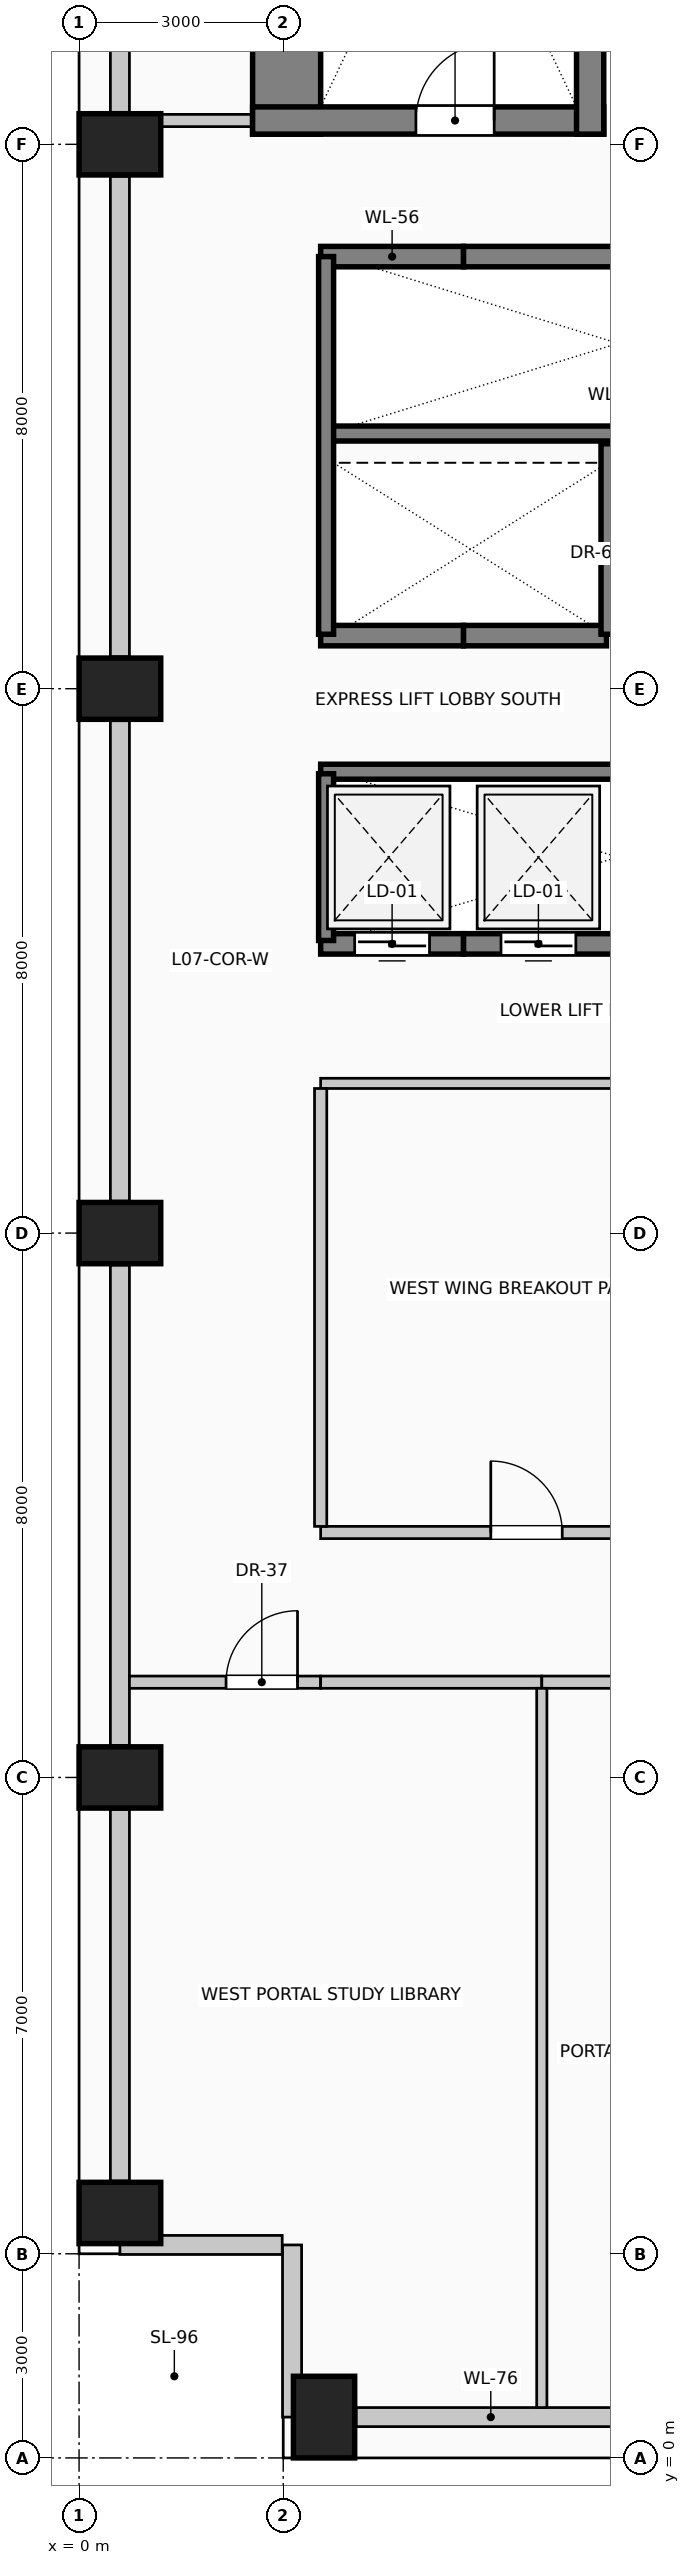
"""IFC4 building model, lengths in metres.
Left out: names, types, materials, properties, quantities, classifications, styles, units other than length and angle.
Written with IfcOpenShell. Run it as: python <this file> out.ifc"""

import sys

from ifc_helpers import new_model, si_unit, direction, frame, frame_2d, origin, origin_2d, place, context, subcontext, project, spatial, rectangle, extrude, element, fill, save


model = new_model("IFC4")
c1 = context("Model", 3, precision=1e-05, world=origin(), true_north=direction((0.0, 1.0)))
c2 = subcontext(c1, "Body", "Model", "MODEL_VIEW")
j1 = project(units=[si_unit("LENGTHUNIT", "METRE"), si_unit("PLANEANGLEUNIT", "RADIAN")], contexts=[c1])
p1 = place(None, origin())
s1 = spatial("IfcSite", under=j1, at=p1, CompositionType="ELEMENT")
p2 = place(p1, origin())
s2 = spatial("IfcBuilding", under=s1, at=p2, CompositionType="ELEMENT")
p3 = place(p2, frame((0.0, 0.0, 30.6)))
s3 = spatial("IfcBuildingStorey", under=s2, at=p3, CompositionType="ELEMENT", Elevation=30.6)
p4 = place(p3, frame((3.05, 34.15, 0.0), z_axis=(0.0, 0.0, 1.0), x_axis=(0.0, 1.0, 0.0)))
e1 = element("IfcWall", 1, at=p4, inside=s3, PredefinedType="SHEAR", context=c2, shape_type="SweptSolid", body=[
    extrude(rectangle(XDim=9.28, YDim=1.0, at=frame_2d((4.64, 0.0))), origin(), (0.0, 0.0, 1.0), 4.0),
])
p5 = place(p3, frame((2.55, 34.35, 0.0), z_axis=(0.0, 0.0, 1.0), x_axis=(1.0, 0.0, 0.0)))
e2 = element("IfcWall", 2, at=p5, inside=s3, PredefinedType="SHEAR", context=c2, shape_type="SweptSolid", body=[
    extrude(rectangle(XDim=5.16, YDim=0.4, at=frame_2d((2.58, 0.0))), origin(), (0.0, 0.0, 1.0), 4.0),
])
p6 = place(p5, frame((2.4, 0.0, 0.0)))
e3 = element("IfcOpeningElement", 3, at=p6, cuts=e2, PredefinedType="OPENING", context=c2, shape_type="SweptSolid", body=[
    extrude(rectangle(XDim=1.15, YDim=2.2, at=frame_2d((0.575, 1.1))), frame((0.0, 0.21, 0.0), z_axis=(0.0, -1.0, 0.0), x_axis=(1.0, 0.0, 0.0)), (0.0, 0.0, 1.0), 0.42),
])
p7 = place(p3, frame((7.51, 34.15, 0.0), z_axis=(0.0, 0.0, 1.0), x_axis=(0.0, 1.0, 0.0)))
e4 = element("IfcWall", 4, at=p7, inside=s3, PredefinedType="SHEAR", context=c2, shape_type="SweptSolid", body=[
    extrude(rectangle(XDim=9.28, YDim=0.4, at=frame_2d((4.64, 0.0))), origin(), (0.0, 0.0, 1.0), 4.0),
])
for number, where, z_axis, x_axis in (
    (5, (3.6, 0.6, 0.0), (0.0, 0.0, 1.0), (1.0, 0.0, 0.0)),
    (6, (0.6, 3.6, 0.0), (0.0, 0.0, 1.0), (0.0, 1.0, 0.0)),
    (7, (0.6, 10.0, 0.0), (0.0, 0.0, 1.0), (0.0, 1.0, 0.0)),
    (8, (0.6, 18.0, 0.0), (0.0, 0.0, 1.0), (0.0, 1.0, 0.0)),
    (9, (0.6, 26.0, 0.0), (0.0, 0.0, 1.0), (0.0, 1.0, 0.0)),
    (10, (0.6, 34.0, 0.0), (0.0, 0.0, 1.0), (0.0, 1.0, 0.0)),
):
    element("IfcColumn", number, at=place(p3, frame(where, z_axis=z_axis, x_axis=x_axis)), inside=s3, PredefinedType="COLUMN", context=c2, shape_type="SweptSolid", body=[
        extrude(rectangle(XDim=0.9, YDim=1.2, at=origin_2d()), origin(), (0.0, 0.0, 1.0), 4.0),
    ])
p8 = place(p3, frame((8.03, 0.6, 0.0), z_axis=(0.0, 0.0, 1.0), x_axis=(-1.0, 0.0, 0.0)))
e11 = element("IfcWall", 11, at=p8, inside=s3, PredefinedType="SOLIDWALL", context=c2, shape_type="SweptSolid", body=[
    extrude(rectangle(XDim=3.96, YDim=0.28, at=frame_2d((1.98, 0.0))), origin(), (0.0, 0.0, 1.0), 2.85),
])
p9 = place(p3, frame((0.6, 4.07, 0.0), z_axis=(0.0, 0.0, 1.0), x_axis=(0.0, 1.0, 0.0)))
e12 = element("IfcWall", 12, at=p9, inside=s3, PredefinedType="SOLIDWALL", context=c2, shape_type="SweptSolid", body=[
    extrude(rectangle(XDim=5.46, YDim=0.28, at=frame_2d((2.73, 0.0))), origin(), (0.0, 0.0, 1.0), 2.85),
])
for number, where, z_axis, x_axis in (
    (13, (0.6, 10.47, 0.0), (0.0, 0.0, 1.0), (0.0, 1.0, 0.0)),
    (14, (0.6, 18.47, 0.0), (0.0, 0.0, 1.0), (0.0, 1.0, 0.0)),
    (15, (0.6, 26.47, 0.0), (0.0, 0.0, 1.0), (0.0, 1.0, 0.0)),
):
    element("IfcWall", number, at=place(p3, frame(where, z_axis=z_axis, x_axis=x_axis)), inside=s3, PredefinedType="SOLIDWALL", context=c2, shape_type="SweptSolid", body=[
        extrude(rectangle(XDim=7.06, YDim=0.28, at=frame_2d((3.53, 0.0))), origin(), (0.0, 0.0, 1.0), 2.85),
    ])
p10 = place(p3, frame((0.6, 34.47, 0.0), z_axis=(0.0, 0.0, 1.0), x_axis=(0.0, 1.0, 0.0)))
e16 = element("IfcWall", 16, at=p10, inside=s3, PredefinedType="SOLIDWALL", context=c2, shape_type="SweptSolid", body=[
    extrude(rectangle(XDim=7.46, YDim=0.28, at=frame_2d((3.73, 0.0))), origin(), (0.0, 0.0, 1.0), 2.85),
])
p11 = place(p3, frame((3.13, 0.6, 0.0), z_axis=(0.0, 0.0, 1.0), x_axis=(0.0, 1.0, 0.0)))
e17 = element("IfcWall", 17, at=p11, inside=s3, PredefinedType="SOLIDWALL", context=c2, shape_type="SweptSolid", body=[
    extrude(rectangle(XDim=2.53, YDim=0.28, at=frame_2d((1.265, 0.0))), origin(), (0.0, 0.0, 1.0), 3.7),
])
p12 = place(p3, frame((2.985, 3.13, 0.0), z_axis=(0.0, 0.0, 1.0), x_axis=(-1.0, 0.0, 0.0)))
e18 = element("IfcWall", 18, at=p12, inside=s3, PredefinedType="SOLIDWALL", context=c2, shape_type="SweptSolid", body=[
    extrude(rectangle(XDim=2.385, YDim=0.28, at=frame_2d((1.192, 0.0))), origin(), (0.0, 0.0, 1.0), 3.7),
])
p13 = place(p3, frame((5.65, 22.25, 0.0), z_axis=(0.0, 0.0, 1.0), x_axis=(-1.0, 0.0, 0.0)))
e19 = element("IfcWall", 19, at=p13, inside=s3, PredefinedType="SOLIDWALL", context=c2, shape_type="SweptSolid", body=[
    extrude(rectangle(XDim=2.1, YDim=0.3, at=frame_2d((1.05, 0.0))), origin(), (0.0, 0.0, 1.0), 4.0),
])
p14 = place(p13, frame((0.5, 0.0, 0.0)))
e20 = element("IfcOpeningElement", 20, at=p14, cuts=e19, PredefinedType="OPENING", context=c2, shape_type="SweptSolid", body=[
    extrude(rectangle(XDim=1.1, YDim=2.2, at=frame_2d((0.55, 1.1))), frame((0.0, 0.16, 0.0), z_axis=(0.0, -1.0, 0.0), x_axis=(1.0, 0.0, 0.0)), (0.0, 0.0, 1.0), 0.32),
])
p15 = place(p3, frame((7.85, 22.25, 0.0), z_axis=(0.0, 0.0, 1.0), x_axis=(-1.0, 0.0, 0.0)))
e21 = element("IfcWall", 21, at=p15, inside=s3, PredefinedType="SOLIDWALL", context=c2, shape_type="SweptSolid", body=[
    extrude(rectangle(XDim=2.2, YDim=0.3, at=frame_2d((1.1, 0.0))), origin(), (0.0, 0.0, 1.0), 4.0),
])
p16 = place(p15, frame((0.55, 0.0, 0.0)))
e22 = element("IfcOpeningElement", 22, at=p16, cuts=e21, PredefinedType="OPENING", context=c2, shape_type="SweptSolid", body=[
    extrude(rectangle(XDim=1.1, YDim=2.2, at=frame_2d((0.55, 1.1))), frame((0.0, 0.16, 0.0), z_axis=(0.0, -1.0, 0.0), x_axis=(1.0, 0.0, 0.0)), (0.0, 0.0, 1.0), 0.32),
])
p17 = place(p3, frame((3.55, 32.35, 0.0), z_axis=(0.0, 0.0, 1.0), x_axis=(1.0, 0.0, 0.0)))
e23 = element("IfcWall", 23, at=p17, inside=s3, PredefinedType="SOLIDWALL", context=c2, shape_type="SweptSolid", body=[
    extrude(rectangle(XDim=2.1, YDim=0.3, at=frame_2d((1.05, 0.0))), origin(), (0.0, 0.0, 1.0), 4.0),
])
p18 = place(p3, frame((5.65, 32.35, 0.0), z_axis=(0.0, 0.0, 1.0), x_axis=(1.0, 0.0, 0.0)))
e24 = element("IfcWall", 24, at=p18, inside=s3, PredefinedType="SOLIDWALL", context=c2, shape_type="SweptSolid", body=[
    extrude(rectangle(XDim=2.2, YDim=0.3, at=frame_2d((1.1, 0.0))), origin(), (0.0, 0.0, 1.0), 4.0),
])
p19 = place(p3, frame((5.65, 26.78, 0.0), z_axis=(0.0, 0.0, 1.0), x_axis=(-1.0, 0.0, 0.0)))
e25 = element("IfcWall", 25, at=p19, inside=s3, PredefinedType="SOLIDWALL", context=c2, shape_type="SweptSolid", body=[
    extrude(rectangle(XDim=2.1, YDim=0.3, at=frame_2d((1.05, 0.0))), origin(), (0.0, 0.0, 1.0), 4.0),
])
p20 = place(p3, frame((7.75, 26.78, 0.0), z_axis=(0.0, 0.0, 1.0), x_axis=(-1.0, 0.0, 0.0)))
e26 = element("IfcWall", 26, at=p20, inside=s3, PredefinedType="SOLIDWALL", context=c2, shape_type="SweptSolid", body=[
    extrude(rectangle(XDim=2.1, YDim=0.3, at=frame_2d((1.05, 0.0))), origin(), (0.0, 0.0, 1.0), 4.0),
])
p21 = place(p3, frame((3.55, 29.75, 0.0), z_axis=(0.0, 0.0, 1.0), x_axis=(1.0, 0.0, 0.0)))
e27 = element("IfcWall", 27, at=p21, inside=s3, PredefinedType="SOLIDWALL", context=c2, shape_type="SweptSolid", body=[
    extrude(rectangle(XDim=8.65, YDim=0.22, at=frame_2d((4.325, 0.0))), origin(), (0.0, 0.0, 1.0), 4.0),
])
p22 = place(p3, frame((3.63, 26.8, 0.0), z_axis=(0.0, 0.0, 1.0), x_axis=(0.0, 1.0, 0.0)))
e28 = element("IfcWall", 28, at=p22, inside=s3, PredefinedType="SOLIDWALL", context=c2, shape_type="SweptSolid", body=[
    extrude(rectangle(XDim=5.55, YDim=0.22, at=frame_2d((2.775, 0.0))), origin(), (0.0, 0.0, 1.0), 4.0),
])
p23 = place(p3, frame((7.78, 26.8, 0.0), z_axis=(0.0, 0.0, 1.0), x_axis=(0.0, 1.0, 0.0)))
e29 = element("IfcWall", 29, at=p23, inside=s3, PredefinedType="SOLIDWALL", context=c2, shape_type="SweptSolid", body=[
    extrude(rectangle(XDim=2.8, YDim=0.22, at=frame_2d((1.4, 0.0))), origin(), (0.0, 0.0, 1.0), 4.0),
])
p24 = place(p3, frame((3.55, 24.78, 0.0), z_axis=(0.0, 0.0, 1.0), x_axis=(1.0, 0.0, 0.0)))
e30 = element("IfcWall", 30, at=p24, inside=s3, PredefinedType="SOLIDWALL", context=c2, shape_type="SweptSolid", body=[
    extrude(rectangle(XDim=8.65, YDim=0.22, at=frame_2d((4.325, 0.0))), origin(), (0.0, 0.0, 1.0), 4.0),
])
p25 = place(p3, frame((3.63, 22.3, 0.0), z_axis=(0.0, 0.0, 1.0), x_axis=(0.0, 1.0, 0.0)))
e31 = element("IfcWall", 31, at=p25, inside=s3, PredefinedType="SOLIDWALL", context=c2, shape_type="SweptSolid", body=[
    extrude(rectangle(XDim=2.45, YDim=0.22, at=frame_2d((1.225, 0.0))), origin(), (0.0, 0.0, 1.0), 4.0),
])
p26 = place(p3, frame((0.74, 11.4, 0.0), z_axis=(0.0, 0.0, 1.0), x_axis=(1.0, 0.0, 0.0)))
e32 = element("IfcWall", 32, at=p26, inside=s3, PredefinedType="PARTITIONING", context=c2, shape_type="SweptSolid", body=[
    extrude(rectangle(XDim=2.81, YDim=0.18, at=frame_2d((1.405, 0.0))), origin(), (0.0, 0.0, 1.0), 3.095),
])
p27 = place(p26, frame((1.42, 0.0, 0.0)))
e33 = element("IfcOpeningElement", 33, at=p27, cuts=e32, PredefinedType="OPENING", context=c2, shape_type="SweptSolid", body=[
    extrude(rectangle(XDim=1.05, YDim=2.15, at=frame_2d((0.525, 1.075))), frame((0.0, 0.1, 0.0), z_axis=(0.0, -1.0, 0.0), x_axis=(1.0, 0.0, 0.0)), (0.0, 0.0, 1.0), 0.2),
])
p28 = place(p3, frame((3.55, 11.4, 0.0), z_axis=(0.0, 0.0, 1.0), x_axis=(1.0, 0.0, 0.0)))
e34 = element("IfcWall", 34, at=p28, inside=s3, PredefinedType="PARTITIONING", context=c2, shape_type="SweptSolid", body=[
    extrude(rectangle(XDim=3.25, YDim=0.18, at=frame_2d((1.625, 0.0))), origin(), (0.0, 0.0, 1.0), 3.095),
])
p29 = place(p3, frame((6.8, 11.4, 0.0), z_axis=(0.0, 0.0, 1.0), x_axis=(1.0, 0.0, 0.0)))
e35 = element("IfcWall", 35, at=p29, inside=s3, PredefinedType="PARTITIONING", context=c2, shape_type="SweptSolid", body=[
    extrude(rectangle(XDim=5.0, YDim=0.18, at=frame_2d((2.5, 0.0))), origin(), (0.0, 0.0, 1.0), 3.095),
])
p30 = place(p29, frame((1.975, 0.0, 0.0)))
e36 = element("IfcOpeningElement", 36, at=p30, cuts=e35, PredefinedType="OPENING", context=c2, shape_type="SweptSolid", body=[
    extrude(rectangle(XDim=1.05, YDim=2.15, at=frame_2d((0.525, 1.075))), frame((0.0, 0.1, 0.0), z_axis=(0.0, -1.0, 0.0), x_axis=(1.0, 0.0, 0.0)), (0.0, 0.0, 1.0), 0.2),
])
p31 = place(p3, frame((3.55, 13.6, 0.0), z_axis=(0.0, 0.0, 1.0), x_axis=(1.0, 0.0, 0.0)))
e37 = element("IfcWall", 37, at=p31, inside=s3, PredefinedType="PARTITIONING", context=c2, shape_type="SweptSolid", body=[
    extrude(rectangle(XDim=6.05, YDim=0.18, at=frame_2d((3.025, 0.0))), origin(), (0.0, 0.0, 1.0), 3.7),
])
p32 = place(p31, frame((2.5, 0.0, 0.0)))
e38 = element("IfcOpeningElement", 38, at=p32, cuts=e37, PredefinedType="OPENING", context=c2, shape_type="SweptSolid", body=[
    extrude(rectangle(XDim=1.05, YDim=2.15, at=frame_2d((0.525, 1.075))), frame((0.0, 0.1, 0.0), z_axis=(0.0, -1.0, 0.0), x_axis=(1.0, 0.0, 0.0)), (0.0, 0.0, 1.0), 0.2),
])
p33 = place(p3, frame((3.55, 20.2, 0.0), z_axis=(0.0, 0.0, 1.0), x_axis=(1.0, 0.0, 0.0)))
e39 = element("IfcWall", 39, at=p33, inside=s3, PredefinedType="PARTITIONING", context=c2, shape_type="SweptSolid", body=[
    extrude(rectangle(XDim=6.05, YDim=0.15, at=frame_2d((3.025, 0.0))), origin(), (0.0, 0.0, 1.0), 3.7),
])
p34 = place(p3, frame((1.2, 34.35, 0.0), z_axis=(0.0, 0.0, 1.0), x_axis=(1.0, 0.0, 0.0)))
e40 = element("IfcWall", 40, at=p34, inside=s3, PredefinedType="PARTITIONING", context=c2, shape_type="SweptSolid", body=[
    extrude(rectangle(XDim=1.35, YDim=0.18, at=frame_2d((0.675, 0.0))), origin(), (0.0, 0.0, 1.0), 3.7),
])
p35 = place(p3, frame((3.55, 13.69, 0.0), z_axis=(0.0, 0.0, 1.0), x_axis=(0.0, 1.0, 0.0)))
e41 = element("IfcWall", 41, at=p35, inside=s3, PredefinedType="PARTITIONING", context=c2, shape_type="SweptSolid", body=[
    extrude(rectangle(XDim=6.435, YDim=0.18, at=frame_2d((3.218, 0.0))), origin(), (0.0, 0.0, 1.0), 3.7),
])
p36 = place(p3, frame((6.8, 0.74, 0.0), z_axis=(0.0, 0.0, 1.0), x_axis=(0.0, 1.0, 0.0)))
e42 = element("IfcWall", 42, at=p36, inside=s3, PredefinedType="PARTITIONING", context=c2, shape_type="SweptSolid", body=[
    extrude(rectangle(XDim=10.57, YDim=0.15, at=frame_2d((5.285, 0.0))), origin(), (0.0, 0.0, 1.0), 3.7),
])
p37 = place(p14, origin())
e43 = element("IfcDoor", 43, at=p37, inside=s3, OperationType="SLIDING_TO_LEFT", PredefinedType="DOOR", context=c2, shape_type="SweptSolid", body=[
    extrude(rectangle(XDim=1.1, YDim=2.2, at=frame_2d((0.55, 1.1))), frame((0.0, 0.025, 0.0), z_axis=(0.0, -1.0, 0.0), x_axis=(1.0, 0.0, 0.0)), (0.0, 0.0, 1.0), 0.05),
])
fill(e20, e43)
p38 = place(p16, origin())
e44 = element("IfcDoor", 44, at=p38, inside=s3, OperationType="SLIDING_TO_RIGHT", PredefinedType="DOOR", context=c2, shape_type="SweptSolid", body=[
    extrude(rectangle(XDim=1.1, YDim=2.2, at=frame_2d((0.55, 1.1))), frame((0.0, 0.025, 0.0), z_axis=(0.0, -1.0, 0.0), x_axis=(1.0, 0.0, 0.0)), (0.0, 0.0, 1.0), 0.05),
])
fill(e22, e44)
p39 = place(p6, origin())
e45 = element("IfcDoor", 45, at=p39, inside=s3, OperationType="SINGLE_SWING_RIGHT", PredefinedType="DOOR", context=c2, shape_type="SweptSolid", body=[
    extrude(rectangle(XDim=1.15, YDim=2.2, at=frame_2d((0.575, 1.1))), frame((0.0, 0.025, 0.0), z_axis=(0.0, -1.0, 0.0), x_axis=(1.0, 0.0, 0.0)), (0.0, 0.0, 1.0), 0.05),
])
fill(e3, e45)
p40 = place(p27, origin())
e46 = element("IfcDoor", 46, at=p40, inside=s3, OperationType="SINGLE_SWING_RIGHT", PredefinedType="DOOR", context=c2, shape_type="SweptSolid", body=[
    extrude(rectangle(XDim=1.05, YDim=2.15, at=frame_2d((0.525, 1.075))), frame((0.0, 0.025, 0.0), z_axis=(0.0, -1.0, 0.0), x_axis=(1.0, 0.0, 0.0)), (0.0, 0.0, 1.0), 0.05),
])
fill(e33, e46)
p41 = place(p32, origin())
e47 = element("IfcDoor", 47, at=p41, inside=s3, OperationType="SINGLE_SWING_LEFT", PredefinedType="DOOR", context=c2, shape_type="SweptSolid", body=[
    extrude(rectangle(XDim=1.05, YDim=2.15, at=frame_2d((0.525, 1.075))), frame((0.0, 0.025, 0.0), z_axis=(0.0, -1.0, 0.0), x_axis=(1.0, 0.0, 0.0)), (0.0, 0.0, 1.0), 0.05),
])
fill(e38, e47)
save(model, sys.argv[1])
